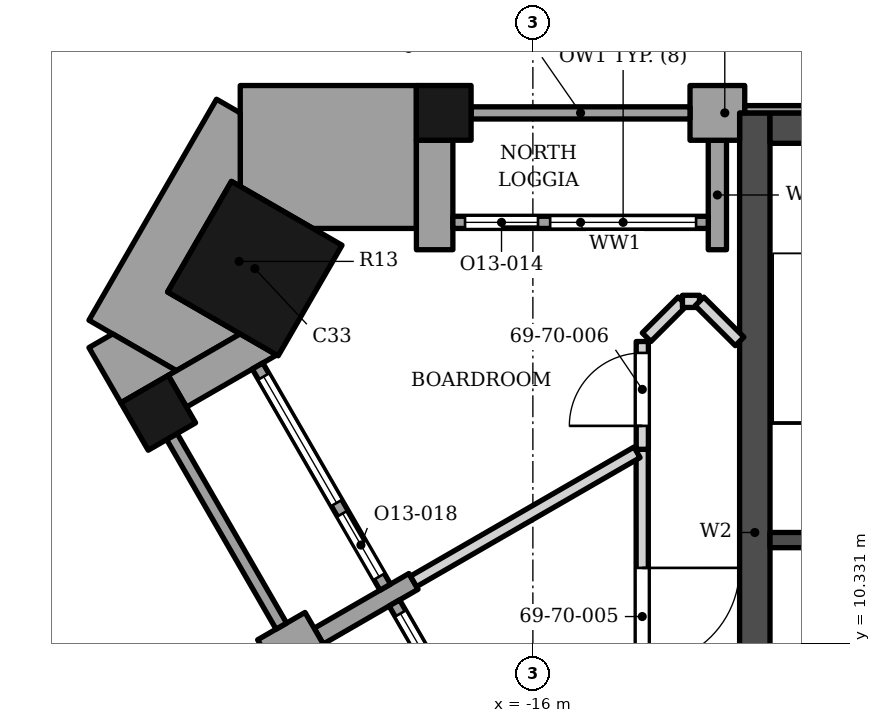
"""IFC4 building model, lengths in metres.
Left out: names, types, materials, properties, quantities, classifications, styles, units other than length and angle.
Written with IfcOpenShell. Run it as: python <this file> out.ifc"""

import sys

from ifc_helpers import new_model, si_unit, direction, frame, frame_2d, origin, origin_2d, place, context, subcontext, project, spatial, polyline, rectangle, outline, extrude, element, fill, save


model = new_model("IFC4")
c1 = context("Model", 3, precision=1e-05, world=origin(), true_north=direction((0.0, 1.0)))
c2 = subcontext(c1, "Body", "Model", "MODEL_VIEW")
j1 = project(units=[si_unit("LENGTHUNIT", "METRE"), si_unit("PLANEANGLEUNIT", "RADIAN")], contexts=[c1])
p1 = place(None, origin())
s1 = spatial("IfcSite", under=j1, at=p1, CompositionType="ELEMENT")
p2 = place(p1, origin())
s2 = spatial("IfcBuilding", under=s1, at=p2, CompositionType="ELEMENT")
p3 = place(p2, frame((0.0, 0.0, 287.2)))
s3 = spatial("IfcBuildingStorey", under=s2, at=p3, CompositionType="ELEMENT", Elevation=287.2)
p4 = place(p3, frame((-12.1, 18.802, 0.0), z_axis=(0.0, 0.0, 1.0), x_axis=(1.0, 0.0, 0.0)))
e1 = element("IfcWall", 1, at=p4, inside=s3, PredefinedType="SHEAR", context=c2, shape_type="SweptSolid", body=[
    extrude(rectangle(XDim=24.2, YDim=0.5, at=frame_2d((12.1, 0.0))), origin(), (0.0, 0.0, 1.0), 3.9),
])
p5 = place(p3, frame((-12.35, 5.253, 0.0), z_axis=(0.0, 0.0, 1.0), x_axis=(0.0, 1.0, 0.0)))
e2 = element("IfcWall", 2, at=p5, inside=s3, PredefinedType="SHEAR", context=c2, shape_type="SweptSolid", body=[
    extrude(rectangle(XDim=13.8, YDim=0.5, at=frame_2d((6.9, 0.0))), origin(), (0.0, 0.0, 1.0), 3.9),
])
p6 = place(p3, frame((-12.1, 12.028, 0.0), z_axis=(0.0, 0.0, 1.0), x_axis=(1.0, 0.0, 0.0)))
e3 = element("IfcWall", 3, at=p6, inside=s3, PredefinedType="SHEAR", context=c2, shape_type="SweptSolid", body=[
    extrude(rectangle(XDim=3.75, YDim=0.25, at=frame_2d((1.875, 0.0))), origin(), (0.0, 0.0, 1.0), 3.9),
])
p7 = place(p3, frame((-20.573, 16.492, 0.0), z_axis=(0.0, 0.0, 1.0), x_axis=(0.866025395058, -0.500000015115, 0.0)))
e4 = element("IfcColumn", 4, at=p7, inside=s3, PredefinedType="COLUMN", context=c2, shape_type="SweptSolid", body=[
    extrude(rectangle(XDim=2.1, YDim=2.1, at=origin_2d()), origin(), (0.0, 0.0, 1.0), 3.9),
])
for number, where, z_axis, x_axis in (
    (5, (-22.162, 14.12, 0.0), (0.0, 0.0, 1.0), (0.5, -0.866, 0.0)),
    (6, (-17.466, 19.053, 0.0), (0.0, 0.0, 1.0), (-1.0, 0.0, 0.0)),
):
    element("IfcColumn", number, at=place(p3, frame(where, z_axis=z_axis, x_axis=x_axis)), inside=s3, PredefinedType="COLUMN", context=c2, shape_type="SweptSolid", body=[
        extrude(rectangle(XDim=0.9, YDim=0.9, at=origin_2d()), origin(), (0.0, 0.0, 1.0), 3.9),
    ])
p8 = place(p3, origin())
e7 = element("IfcWall", 7, at=p8, inside=s3, PredefinedType="SOLIDWALL", context=c2, shape_type="SweptSolid", body=[
    extrude(outline(polyline([(-21.997, 14.735), (-21.697, 14.215), (-20.213, 15.072), (-20.813, 15.418), (-21.997, 14.735)])), origin(), (0.0, 0.0, 1.0), 3.0),
])
p9 = place(p3, frame((-20.302, 9.998, 0.0), z_axis=(0.0, 0.0, 1.0), x_axis=(0.866013897511, 0.50001992892, 0.0)))
e8 = element("IfcWall", 8, at=p9, inside=s3, PredefinedType="SOLIDWALL", context=c2, shape_type="SweptSolid", body=[
    extrude(rectangle(XDim=0.9, YDim=0.9, at=frame_2d((0.45, 0.0))), origin(), (0.0, 0.0, 1.0), 3.0),
])
p10 = place(p3, frame((-17.963, 11.348, 0.0), z_axis=(0.0, 0.0, 1.0), x_axis=(-0.866047807691, -0.499961193289, 0.0)))
e9 = element("IfcWall", 9, at=p10, inside=s3, PredefinedType="SOLIDWALL", context=c2, shape_type="SweptSolid", body=[
    extrude(rectangle(XDim=1.8, YDim=0.3, at=frame_2d((0.9, 0.0))), origin(), (0.0, 0.0, 1.0), 3.0),
])
p11 = place(p3, frame((-21.937, 13.73, 0.0), z_axis=(0.0, 0.0, 1.0), x_axis=(0.499931829785, -0.866064758299, 0.0)))
e10 = element("IfcWall", 10, at=p11, inside=s3, PredefinedType="SOLIDWALL", context=c2, shape_type="SweptSolid", body=[
    extrude(rectangle(XDim=3.6, YDim=0.2, at=frame_2d((1.8, 0.0))), origin(), (0.0, 0.0, 1.0), 3.0),
])
p12 = place(p3, frame((-20.528, 14.89, 0.0), z_axis=(0.0, 0.0, 1.0), x_axis=(0.500027713859, -0.866009402589, 0.0)))
e11 = element("IfcWall", 11, at=p12, inside=s3, PredefinedType="ELEMENTEDWALL", context=c2, shape_type="SweptSolid", body=[
    extrude(rectangle(XDim=4.2, YDim=0.2, at=frame_2d((2.1, 0.0))), origin(), (0.0, 0.0, 1.0), 3.0),
])
p13 = place(p12, frame((0.2, 0.0, 0.45)))
e12 = element("IfcOpeningElement", 12, at=p13, cuts=e11, PredefinedType="OPENING", context=c2, shape_type="SweptSolid", body=[
    extrude(rectangle(XDim=2.4, YDim=2.25, at=frame_2d((1.2, 1.125))), frame((0.0, 0.11, 0.0), z_axis=(0.0, -1.0, 0.0), x_axis=(1.0, 0.0, 0.0)), (0.0, 0.0, 1.0), 0.22),
])
p14 = place(p12, frame((2.8, 0.0, 0.0)))
e13 = element("IfcOpeningElement", 13, at=p14, cuts=e11, PredefinedType="OPENING", context=c2, shape_type="SweptSolid", body=[
    extrude(rectangle(XDim=1.2, YDim=2.7, at=frame_2d((0.6, 1.35))), frame((0.0, 0.11, 0.0), z_axis=(0.0, -1.0, 0.0), x_axis=(1.0, 0.0, 0.0)), (0.0, 0.0, 1.0), 0.22),
])
p15 = place(p3, frame((-18.278, 10.993, 0.0), z_axis=(0.0, 0.0, 1.0), x_axis=(0.500002543286, -0.866023935413, 0.0)))
e14 = element("IfcWall", 14, at=p15, inside=s3, PredefinedType="ELEMENTEDWALL", context=c2, shape_type="SweptSolid", body=[
    extrude(rectangle(XDim=4.2, YDim=0.2, at=frame_2d((2.1, 0.0))), origin(), (0.0, 0.0, 1.0), 3.0),
])
p16 = place(p15, frame((0.2, 0.0, 0.45)))
e15 = element("IfcOpeningElement", 15, at=p16, cuts=e14, PredefinedType="OPENING", context=c2, shape_type="SweptSolid", body=[
    extrude(rectangle(XDim=3.8, YDim=2.25, at=frame_2d((1.9, 1.125))), frame((0.0, 0.11, 0.0), z_axis=(0.0, -1.0, 0.0), x_axis=(1.0, 0.0, 0.0)), (0.0, 0.0, 1.0), 0.22),
])
p17 = place(p3, origin())
e16 = element("IfcWall", 16, at=p17, inside=s3, PredefinedType="SOLIDWALL", context=c2, shape_type="SweptSolid", body=[
    extrude(outline(polyline([(-12.516, 19.052), (-12.516, 19.502), (-13.416, 19.502), (-13.416, 18.603), (-12.6, 18.603), (-12.6, 19.052), (-12.516, 19.052)])), origin(), (0.0, 0.0, 1.0), 3.0),
])
p18 = place(p3, origin())
e17 = element("IfcWall", 17, at=p18, inside=s3, PredefinedType="SOLIDWALL", context=c2, shape_type="SweptSolid", body=[
    extrude(outline(polyline([(-12.816, 16.802), (-12.816, 18.603), (-13.116, 18.603), (-13.116, 16.802), (-12.816, 16.802)])), origin(), (0.0, 0.0, 1.0), 3.0),
])
p19 = place(p3, origin())
e18 = element("IfcWall", 18, at=p19, inside=s3, PredefinedType="SOLIDWALL", context=c2, shape_type="SweptSolid", body=[
    extrude(outline(polyline([(-17.916, 18.603), (-17.916, 16.802), (-17.316, 16.802), (-17.316, 18.603), (-17.916, 18.603)])), origin(), (0.0, 0.0, 1.0), 3.0),
])
p20 = place(p3, origin())
e19 = element("IfcWall", 19, at=p20, inside=s3, PredefinedType="SOLIDWALL", context=c2, shape_type="SweptSolid", body=[
    extrude(outline(polyline([(-12.515, 19.173), (-12.515, 19.052), (-8.916, 19.052), (-8.916, 19.173), (-12.515, 19.173)])), origin(), (0.0, 0.0, 1.0), 3.0),
])
p21 = place(p3, frame((-13.416, 19.052, 0.0), z_axis=(0.0, 0.0, 1.0), x_axis=(-1.0, 0.0, 0.0)))
e20 = element("IfcWall", 20, at=p21, inside=s3, PredefinedType="SOLIDWALL", context=c2, shape_type="SweptSolid", body=[
    extrude(rectangle(XDim=3.6, YDim=0.2, at=frame_2d((1.8, 0.0))), origin(), (0.0, 0.0, 1.0), 3.0),
])
p22 = place(p3, frame((-13.116, 17.252, 0.0), z_axis=(0.0, 0.0, 1.0), x_axis=(-1.0, 0.0, 0.0)))
e21 = element("IfcWall", 21, at=p22, inside=s3, PredefinedType="ELEMENTEDWALL", context=c2, shape_type="SweptSolid", body=[
    extrude(rectangle(XDim=4.2, YDim=0.2, at=frame_2d((2.1, 0.0))), origin(), (0.0, 0.0, 1.0), 3.0),
])
p23 = place(p22, frame((0.2, 0.0, 0.45)))
e22 = element("IfcOpeningElement", 22, at=p23, cuts=e21, PredefinedType="OPENING", context=c2, shape_type="SweptSolid", body=[
    extrude(rectangle(XDim=2.4, YDim=2.25, at=frame_2d((1.2, 1.125))), frame((0.0, 0.11, 0.0), z_axis=(0.0, -1.0, 0.0), x_axis=(1.0, 0.0, 0.0)), (0.0, 0.0, 1.0), 0.22),
])
p24 = place(p22, frame((2.8, 0.0, 0.0)))
e23 = element("IfcOpeningElement", 23, at=p24, cuts=e21, PredefinedType="OPENING", context=c2, shape_type="SweptSolid", body=[
    extrude(rectangle(XDim=1.2, YDim=2.7, at=frame_2d((0.6, 1.35))), frame((0.0, 0.11, 0.0), z_axis=(0.0, -1.0, 0.0), x_axis=(1.0, 0.0, 0.0)), (0.0, 0.0, 1.0), 0.22),
])
p25 = place(p3, origin())
e24 = element("IfcWall", 24, at=p25, inside=s3, PredefinedType="SOLIDWALL", context=c2, shape_type="SweptSolid", body=[
    extrude(outline(polyline([(-19.617, 17.153), (-17.916, 17.153), (-17.916, 18.603), (-17.916, 18.603), (-17.916, 19.502), (-20.813, 19.502), (-20.813, 17.843), (-19.617, 17.153)])), origin(), (0.0, 0.0, 1.0), 3.0),
])
p26 = place(p3, origin())
e25 = element("IfcWall", 25, at=p26, inside=s3, PredefinedType="SOLIDWALL", context=c2, shape_type="SweptSolid", body=[
    extrude(outline(polyline([(-20.957, 17.926), (-20.813, 17.843), (-20.813, 19.052), (-21.202, 19.278), (-23.301, 15.643), (-21.863, 14.812), (-20.813, 15.418), (-22.007, 16.108), (-20.957, 17.926)])), origin(), (0.0, 0.0, 1.0), 3.0),
])
p27 = place(p3, origin())
e26 = element("IfcWall", 26, at=p27, inside=s3, PredefinedType="SOLIDWALL", context=c2, shape_type="SweptSolid", body=[
    extrude(outline(polyline([(-21.997, 14.735), (-21.863, 14.812), (-22.911, 15.418), (-23.301, 15.193), (-22.777, 14.285), (-21.997, 14.735), (-21.997, 14.735)])), origin(), (0.0, 0.0, 1.0), 3.0),
])
p28 = place(p3, frame((-14.202, 13.52, 0.0), z_axis=(0.0, 0.0, 1.0), x_axis=(0.000266228859, -0.999999964561, 0.0)))
e27 = element("IfcWall", 27, at=p28, inside=s3, PredefinedType="PARTITIONING", context=c2, shape_type="SweptSolid", body=[
    extrude(rectangle(XDim=5.502, YDim=0.2, at=frame_2d((2.751, 0.0))), origin(), (0.0, 0.0, 1.0), 3.73),
])
p29 = place(p28, frame((1.95, 0.0, 0.0)))
e28 = element("IfcOpeningElement", 28, at=p29, cuts=e27, PredefinedType="OPENING", context=c2, shape_type="SweptSolid", body=[
    extrude(rectangle(XDim=1.6, YDim=2.1, at=frame_2d((0.8, 1.05))), frame((0.0, 0.11, 0.0), z_axis=(0.0, -1.0, 0.0), x_axis=(1.0, 0.0, 0.0)), (0.0, 0.0, 1.0), 0.22),
])
p30 = place(p3, frame((-17.963, 11.348, 0.0), z_axis=(0.0, 0.0, 1.0), x_axis=(0.866018937599, 0.500011199594, 0.0)))
e29 = element("IfcWall", 29, at=p30, inside=s3, PredefinedType="PARTITIONING", context=c2, shape_type="SweptSolid", body=[
    extrude(rectangle(XDim=4.245, YDim=0.2, at=frame_2d((2.123, 0.0))), origin(), (0.0, 0.0, 1.0), 3.128),
])
p31 = place(p3, frame((-14.2, 13.521, 0.0), z_axis=(0.0, 0.0, 1.0), x_axis=(0.0, 1.0, 0.0)))
e30 = element("IfcWall", 30, at=p31, inside=s3, PredefinedType="PARTITIONING", context=c2, shape_type="SweptSolid", body=[
    extrude(rectangle(XDim=1.772, YDim=0.2, at=frame_2d((0.886, 0.0))), origin(), (0.0, 0.0, 1.0), 3.73),
])
p32 = place(p31, frame((0.385, 0.0, 0.0)))
e31 = element("IfcOpeningElement", 31, at=p32, cuts=e30, PredefinedType="OPENING", context=c2, shape_type="SweptSolid", body=[
    extrude(rectangle(XDim=1.2, YDim=2.4, at=frame_2d((0.6, 1.2))), frame((0.0, 0.11, 0.0), z_axis=(0.0, -1.0, 0.0), x_axis=(1.0, 0.0, 0.0)), (0.0, 0.0, 1.0), 0.22),
])
p33 = place(p3, frame((-14.13, 15.364, 0.0), z_axis=(0.0, 0.0, 1.0), x_axis=(0.707106781187, 0.707106781187, 0.0)))
e32 = element("IfcWall", 32, at=p33, inside=s3, PredefinedType="PARTITIONING", context=c2, shape_type="SweptSolid", body=[
    extrude(rectangle(XDim=0.834, YDim=0.2, at=frame_2d((0.417, 0.0))), origin(), (0.0, 0.0, 1.0), 3.73),
])
p34 = place(p3, frame((-13.54, 15.953, 0.0), z_axis=(0.0, 0.0, 1.0), x_axis=(0.99999962061, -0.000871079809, 0.0)))
e33 = element("IfcWall", 33, at=p34, inside=s3, PredefinedType="PARTITIONING", context=c2, shape_type="SweptSolid", body=[
    extrude(rectangle(XDim=0.28, YDim=0.2, at=frame_2d((0.14, 0.0))), origin(), (0.0, 0.0, 1.0), 3.73),
])
p35 = place(p3, frame((-13.26, 15.953, 0.0), z_axis=(0.0, 0.0, 1.0), x_axis=(0.708285399161, -0.705926195389, 0.0)))
e34 = element("IfcWall", 34, at=p35, inside=s3, PredefinedType="PARTITIONING", context=c2, shape_type="SweptSolid", body=[
    extrude(rectangle(XDim=0.931, YDim=0.2, at=frame_2d((0.466, 0.0))), origin(), (0.0, 0.0, 1.0), 3.73),
])
p36 = place(p13, origin())
e35 = element("IfcWindow", 35, at=p36, inside=s3, PartitioningType="SINGLE_PANEL", PredefinedType="WINDOW", context=c2, shape_type="SweptSolid", body=[
    extrude(rectangle(XDim=2.4, YDim=2.25, at=frame_2d((1.2, 1.125))), frame((0.0, 0.03, 0.0), z_axis=(0.0, -1.0, 0.0), x_axis=(1.0, 0.0, 0.0)), (0.0, 0.0, 1.0), 0.06),
])
fill(e12, e35)
p37 = place(p14, origin())
e36 = element("IfcDoor", 36, at=p37, inside=s3, OperationType="SINGLE_SWING_LEFT", PredefinedType="DOOR", context=c2, shape_type="SweptSolid", body=[
    extrude(rectangle(XDim=1.2, YDim=2.7, at=frame_2d((0.6, 1.35))), frame((0.0, 0.025, 0.0), z_axis=(0.0, -1.0, 0.0), x_axis=(1.0, 0.0, 0.0)), (0.0, 0.0, 1.0), 0.05),
])
fill(e13, e36)
p38 = place(p16, origin())
e37 = element("IfcWindow", 37, at=p38, inside=s3, PartitioningType="SINGLE_PANEL", PredefinedType="WINDOW", context=c2, shape_type="SweptSolid", body=[
    extrude(rectangle(XDim=3.8, YDim=2.25, at=frame_2d((1.9, 1.125))), frame((0.0, 0.03, 0.0), z_axis=(0.0, -1.0, 0.0), x_axis=(1.0, 0.0, 0.0)), (0.0, 0.0, 1.0), 0.06),
])
fill(e15, e37)
p39 = place(p23, origin())
e38 = element("IfcWindow", 38, at=p39, inside=s3, PartitioningType="SINGLE_PANEL", PredefinedType="WINDOW", context=c2, shape_type="SweptSolid", body=[
    extrude(rectangle(XDim=2.4, YDim=2.25, at=frame_2d((1.2, 1.125))), frame((0.0, 0.03, 0.0), z_axis=(0.0, -1.0, 0.0), x_axis=(1.0, 0.0, 0.0)), (0.0, 0.0, 1.0), 0.06),
])
fill(e22, e38)
p40 = place(p24, origin())
e39 = element("IfcDoor", 39, at=p40, inside=s3, OperationType="SINGLE_SWING_LEFT", PredefinedType="DOOR", context=c2, shape_type="SweptSolid", body=[
    extrude(rectangle(XDim=1.2, YDim=2.7, at=frame_2d((0.6, 1.35))), frame((0.0, 0.025, 0.0), z_axis=(0.0, -1.0, 0.0), x_axis=(1.0, 0.0, 0.0)), (0.0, 0.0, 1.0), 0.05),
])
fill(e23, e39)
p41 = place(p29, origin())
e40 = element("IfcDoor", 40, at=p41, inside=s3, OperationType="DOUBLE_DOOR_SINGLE_SWING", PredefinedType="DOOR", context=c2, shape_type="SweptSolid", body=[
    extrude(rectangle(XDim=1.6, YDim=2.1, at=frame_2d((0.8, 1.05))), frame((0.0, 0.025, 0.0), z_axis=(0.0, -1.0, 0.0), x_axis=(1.0, 0.0, 0.0)), (0.0, 0.0, 1.0), 0.05),
])
fill(e28, e40)
p42 = place(p32, origin())
e41 = element("IfcDoor", 41, at=p42, inside=s3, OperationType="SINGLE_SWING_LEFT", PredefinedType="DOOR", context=c2, shape_type="SweptSolid", body=[
    extrude(rectangle(XDim=1.2, YDim=2.4, at=frame_2d((0.6, 1.2))), frame((0.0, 0.025, 0.0), z_axis=(0.0, -1.0, 0.0), x_axis=(1.0, 0.0, 0.0)), (0.0, 0.0, 1.0), 0.05),
])
fill(e31, e41)
save(model, sys.argv[1])
